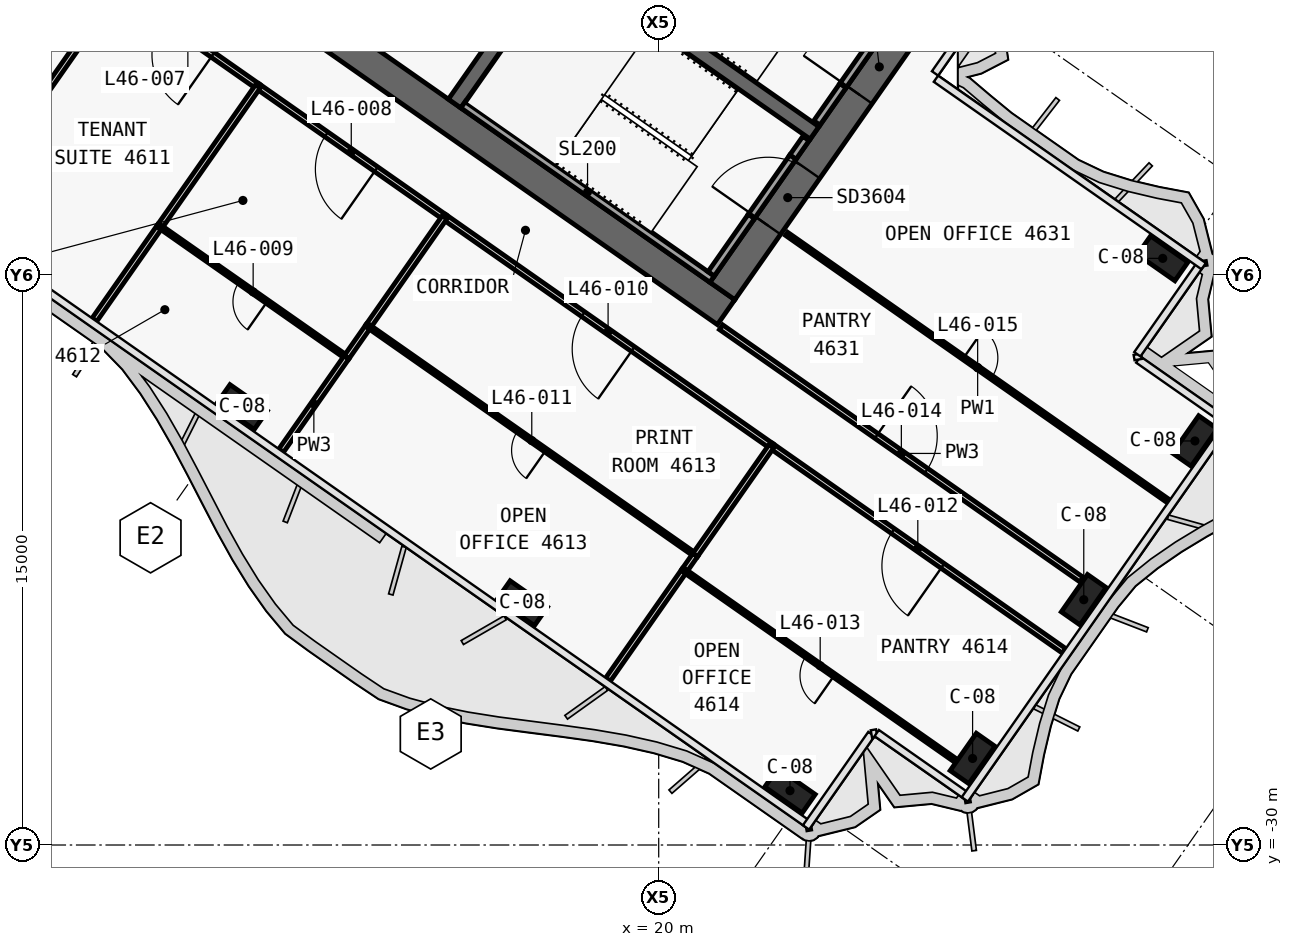
"""IFC4 building model, lengths in metres.
Left out: names, types, materials, properties, quantities, classifications, styles, units other than length and angle.
Written with IfcOpenShell. Run it as: python <this file> out.ifc"""

import sys

from ifc_helpers import new_model, si_unit, direction, frame, frame_2d, origin, origin_2d, place, context, subcontext, project, spatial, polyline, rectangle, outline, extrude, element, fill, save


model = new_model("IFC4")
c1 = context("Model", 3, precision=1e-05, world=origin(), true_north=direction((0.0, 1.0)))
c2 = subcontext(c1, "Body", "Model", "MODEL_VIEW")
j1 = project(units=[si_unit("LENGTHUNIT", "METRE"), si_unit("PLANEANGLEUNIT", "RADIAN")], contexts=[c1])
p1 = place(None, origin())
s1 = spatial("IfcSite", under=j1, at=p1, CompositionType="ELEMENT")
p2 = place(p1, origin())
s2 = spatial("IfcBuilding", under=s1, at=p2, CompositionType="ELEMENT")
p3 = place(p2, frame((0.0, 0.0, 198.3)))
s3 = spatial("IfcBuildingStorey", under=s2, at=p3, CompositionType="ELEMENT", Elevation=198.3)
p4 = place(p3, frame((-0.029, -0.712, 0.0), z_axis=(0.0, 0.0, 1.0), x_axis=(0.819151758019, -0.573576845187, 0.0)))
e1 = element("IfcWall", 1, at=p4, inside=s3, PredefinedType="SHEAR", context=c2, shape_type="SweptSolid", body=[
    extrude(outline(polyline([(26.616, 0.4), (-0.0, 0.4), (0.56, -0.4), (26.616, -0.4), (26.616, 0.4)])), origin(), (0.0, 0.0, 1.0), 3.9),
])
p5 = place(p4, frame((1.166, 0.0, 0.0)))
e2 = element("IfcOpeningElement", 2, at=p5, cuts=e1, PredefinedType="OPENING", context=c2, shape_type="SweptSolid", body=[
    extrude(rectangle(XDim=1.5, YDim=2.1, at=frame_2d((0.75, 1.05))), frame((0.0, 0.41, 0.0), z_axis=(0.0, -1.0, 0.0), x_axis=(1.0, 0.0, 0.0)), (0.0, 0.0, 1.0), 0.82),
])
p6 = place(p4, frame((12.366, 0.0, 0.0)))
e3 = element("IfcOpeningElement", 3, at=p6, cuts=e1, PredefinedType="OPENING", context=c2, shape_type="SweptSolid", body=[
    extrude(rectangle(XDim=1.5, YDim=2.1, at=frame_2d((0.75, 1.05))), frame((0.0, 0.41, 0.0), z_axis=(0.0, -1.0, 0.0), x_axis=(1.0, 0.0, 0.0)), (0.0, 0.0, 1.0), 0.82),
])
p7 = place(p3, frame((21.675, -15.421, 0.0), z_axis=(0.0, 0.0, 1.0), x_axis=(0.573581815061, 0.819148278049, 0.0)))
e4 = element("IfcWall", 4, at=p7, inside=s3, PredefinedType="SHEAR", context=c2, shape_type="SweptSolid", body=[
    extrude(outline(polyline([(9.6, 0.4), (0.0, 0.4), (0.0, -0.4), (9.6, -0.4), (9.6, 0.4)])), origin(), (0.0, 0.0, 1.0), 3.9),
])
p8 = place(p7, frame((6.3, 0.0, 0.0)))
e5 = element("IfcOpeningElement", 5, at=p8, cuts=e4, PredefinedType="OPENING", context=c2, shape_type="SweptSolid", body=[
    extrude(rectangle(XDim=1.8, YDim=2.1, at=frame_2d((0.9, 1.05))), frame((0.0, 0.41, 0.0), z_axis=(0.0, -1.0, 0.0), x_axis=(1.0, 0.0, 0.0)), (0.0, 0.0, 1.0), 0.82),
])
p9 = place(p7, frame((2.1, 0.0, 0.0)))
e6 = element("IfcOpeningElement", 6, at=p9, cuts=e4, PredefinedType="OPENING", context=c2, shape_type="SweptSolid", body=[
    extrude(rectangle(XDim=1.8, YDim=2.1, at=frame_2d((0.9, 1.05))), frame((0.0, 0.41, 0.0), z_axis=(0.0, -1.0, 0.0), x_axis=(1.0, 0.0, 0.0)), (0.0, 0.0, 1.0), 0.82),
])
p10 = place(p3, frame((14.63, -10.488, 0.0), z_axis=(0.0, 0.0, 1.0), x_axis=(0.573611936273, 0.819127185829, 0.0)))
e7 = element("IfcWall", 7, at=p10, inside=s3, PredefinedType="SHEAR", context=c2, shape_type="SweptSolid", body=[
    extrude(outline(polyline([(0.0, 0.2), (0.0, -0.2), (4.6, -0.2), (4.6, 0.2), (0.0, 0.2)])), origin(), (0.0, 0.0, 1.0), 3.9),
])
p11 = place(p3, frame((2.638, 3.768, 0.0), z_axis=(0.0, 0.0, 1.0), x_axis=(0.81915267502, -0.573575535572, 0.0)))
e8 = element("IfcWall", 8, at=p11, inside=s3, PredefinedType="SHEAR", context=c2, shape_type="SweptSolid", body=[
    extrude(outline(polyline([(0.0, 0.2), (0.0, -0.2), (26.2, -0.2), (26.2, 0.2), (0.0, 0.2)])), origin(), (0.0, 0.0, 1.0), 3.9),
])
p12 = place(p11, frame((9.637, 0.0, 0.0)))
e9 = element("IfcOpeningElement", 9, at=p12, cuts=e8, PredefinedType="OPENING", context=c2, shape_type="SweptSolid", body=[
    extrude(rectangle(XDim=1.2, YDim=2.1, at=frame_2d((0.6, 1.05))), frame((0.0, 0.21, 0.0), z_axis=(0.0, -1.0, 0.0), x_axis=(1.0, 0.0, 0.0)), (0.0, 0.0, 1.0), 0.42),
])
p13 = place(p11, frame((11.812, 0.0, 0.0)))
e10 = element("IfcOpeningElement", 10, at=p13, cuts=e8, PredefinedType="OPENING", context=c2, shape_type="SweptSolid", body=[
    extrude(rectangle(XDim=1.2, YDim=2.1, at=frame_2d((0.6, 1.05))), frame((0.0, 0.21, 0.0), z_axis=(0.0, -1.0, 0.0), x_axis=(1.0, 0.0, 0.0)), (0.0, 0.0, 1.0), 0.42),
])
p14 = place(p11, frame((13.988, 0.0, 0.0)))
e11 = element("IfcOpeningElement", 11, at=p14, cuts=e8, PredefinedType="OPENING", context=c2, shape_type="SweptSolid", body=[
    extrude(rectangle(XDim=1.2, YDim=2.1, at=frame_2d((0.6, 1.05))), frame((0.0, 0.21, 0.0), z_axis=(0.0, -1.0, 0.0), x_axis=(1.0, 0.0, 0.0)), (0.0, 0.0, 1.0), 0.42),
])
p15 = place(p11, frame((16.262, 0.0, 0.0)))
e12 = element("IfcOpeningElement", 12, at=p15, cuts=e8, PredefinedType="OPENING", context=c2, shape_type="SweptSolid", body=[
    extrude(rectangle(XDim=1.0, YDim=2.1, at=frame_2d((0.5, 1.05))), frame((0.0, 0.21, 0.0), z_axis=(0.0, -1.0, 0.0), x_axis=(1.0, 0.0, 0.0)), (0.0, 0.0, 1.0), 0.42),
])
for number, where, z_axis, x_axis in (
    (13, (9.038, -18.475, 0.0), (0.0, 0.0, 1.0), (0.819, -0.574, 0.0)),
    (14, (16.41, -23.637, 0.0), (0.0, 0.0, 1.0), (0.819, -0.574, 0.0)),
    (15, (23.455, -28.57, 0.0), (0.0, 0.0, 1.0), (0.819, -0.574, 0.0)),
    (16, (33.263, -14.562, 0.0), (0.0, 0.0, 1.0), (0.819, -0.574, 0.0)),
    (17, (28.26, -27.723, 0.0), (0.0, 0.0, 1.0), (0.574, 0.819, 0.0)),
    (18, (31.185, -23.545, 0.0), (0.0, 0.0, 1.0), (0.574, 0.819, 0.0)),
    (19, (34.11, -19.367, 0.0), (0.0, 0.0, 1.0), (0.574, 0.819, 0.0)),
):
    element("IfcColumn", number, at=place(p3, frame(where, z_axis=z_axis, x_axis=x_axis)), inside=s3, PredefinedType="COLUMN", context=c2, shape_type="SweptSolid", body=[
        extrude(rectangle(XDim=1.2, YDim=0.6, at=origin_2d()), origin(), (0.0, 0.0, 1.0), 3.9),
    ])
p16 = place(p3, frame((24.162, -10.998, 0.0), z_axis=(0.0, 0.0, 1.0), x_axis=(0.573612502218, 0.819126789514, 0.0)))
e20 = element("IfcWall", 20, at=p16, inside=s3, PredefinedType="SOLIDWALL", context=c2, shape_type="SweptSolid", body=[
    extrude(rectangle(XDim=1.2, YDim=0.2, at=frame_2d((0.6, 0.0))), origin(), (0.0, 0.0, 1.0), 3.62),
])
p17 = place(p3, frame((24.85, -10.014, 2.15), z_axis=(0.0, 0.0, 1.0), x_axis=(0.573505465124, 0.819201734296, 0.0)))
e21 = element("IfcWall", 21, at=p17, inside=s3, PredefinedType="SOLIDWALL", context=c2, shape_type="SweptSolid", body=[
    extrude(rectangle(XDim=1.9, YDim=0.2, at=frame_2d((0.95, 0.0))), origin(), (0.0, 0.0, 1.0), 1.47),
])
p18 = place(p3, frame((14.851, -10.521, 0.0), z_axis=(0.0, 0.0, 1.0), x_axis=(0.819141584393, -0.57359137434, 0.0)))
e22 = element("IfcWall", 22, at=p18, inside=s3, PredefinedType="SOLIDWALL", context=c2, shape_type="SweptSolid", body=[
    extrude(rectangle(XDim=8.0, YDim=0.2, at=frame_2d((4.0, 0.0))), origin(), (0.0, 0.0, 1.0), 3.62),
])
p19 = place(p3, frame((21.38, -14.97, 0.0), z_axis=(0.0, 0.0, 1.0), x_axis=(0.573559770908, 0.819163713305, 0.0)))
e23 = element("IfcWall", 23, at=p19, inside=s3, PredefinedType="SOLIDWALL", context=c2, shape_type="SweptSolid", body=[
    extrude(rectangle(XDim=1.85, YDim=0.2, at=frame_2d((0.925, 0.0))), origin(), (0.0, 0.0, 1.0), 3.62),
])
p20 = place(p3, frame((23.531, -11.898, 0.0), z_axis=(0.0, 0.0, 1.0), x_axis=(0.573708088123, 0.819059844958, 0.0)))
e24 = element("IfcWall", 24, at=p20, inside=s3, PredefinedType="SOLIDWALL", context=c2, shape_type="SweptSolid", body=[
    extrude(rectangle(XDim=0.6, YDim=0.2, at=frame_2d((0.3, 0.0))), origin(), (0.0, 0.0, 1.0), 3.62),
])
p21 = place(p3, frame((22.441, -13.455, 2.15), z_axis=(0.0, 0.0, 1.0), x_axis=(0.573591692345, 0.819141361715, 0.0)))
e25 = element("IfcWall", 25, at=p21, inside=s3, PredefinedType="SOLIDWALL", context=c2, shape_type="SweptSolid", body=[
    extrude(rectangle(XDim=1.9, YDim=0.2, at=frame_2d((0.95, 0.0))), origin(), (0.0, 0.0, 1.0), 1.47),
])
p22 = place(p3, frame((21.642, -16.375, 0.0), z_axis=(0.0, 0.0, 1.0), x_axis=(0.819150694041, -0.573578364701, 0.0)))
e26 = element("IfcWall", 26, at=p22, inside=s3, PredefinedType="PARTITIONING", context=c2, shape_type="SweptSolid", body=[
    extrude(rectangle(XDim=11.58, YDim=0.15, at=frame_2d((5.79, 0.0))), origin(), (0.0, 0.0, 1.0), 3.0),
])
p23 = place(p22, frame((4.99, 0.0, 0.0)))
e27 = element("IfcOpeningElement", 27, at=p23, cuts=e26, PredefinedType="OPENING", context=c2, shape_type="SweptSolid", body=[
    extrude(rectangle(XDim=1.6, YDim=2.1, at=frame_2d((0.8, 1.05))), frame((0.0, 0.085, 0.0), z_axis=(0.0, -1.0, 0.0), x_axis=(1.0, 0.0, 0.0)), (0.0, 0.0, 1.0), 0.17),
])
p24 = place(p3, frame((9.454, -10.038, 0.0), z_axis=(0.0, 0.0, 1.0), x_axis=(-0.819142740634, 0.573589723117, 0.0)))
e28 = element("IfcWall", 28, at=p24, inside=s3, PredefinedType="PARTITIONING", context=c2, shape_type="SweptSolid", body=[
    extrude(rectangle(XDim=4.502, YDim=0.15, at=frame_2d((2.251, 0.0))), origin(), (0.0, 0.0, 1.0), 3.0),
])
p25 = place(p24, frame((1.451, 0.0, 0.0)))
e29 = element("IfcOpeningElement", 29, at=p25, cuts=e28, PredefinedType="OPENING", context=c2, shape_type="SweptSolid", body=[
    extrude(rectangle(XDim=1.6, YDim=2.1, at=frame_2d((0.8, 1.05))), frame((0.0, 0.085, 0.0), z_axis=(0.0, -1.0, 0.0), x_axis=(1.0, 0.0, 0.0)), (0.0, 0.0, 1.0), 0.17),
])
p26 = place(p3, frame((14.369, -13.479, 0.0), z_axis=(0.0, 0.0, 1.0), x_axis=(-0.819165052243, 0.573557858619, 0.0)))
e30 = element("IfcWall", 30, at=p26, inside=s3, PredefinedType="PARTITIONING", context=c2, shape_type="SweptSolid", body=[
    extrude(rectangle(XDim=6.004, YDim=0.15, at=frame_2d((3.002, 0.0))), origin(), (0.0, 0.0, 1.0), 3.0),
])
p27 = place(p26, frame((2.202, 0.0, 0.0)))
e31 = element("IfcOpeningElement", 31, at=p27, cuts=e30, PredefinedType="OPENING", context=c2, shape_type="SweptSolid", body=[
    extrude(rectangle(XDim=1.6, YDim=2.1, at=frame_2d((0.8, 1.05))), frame((0.0, 0.085, 0.0), z_axis=(0.0, -1.0, 0.0), x_axis=(1.0, 0.0, 0.0)), (0.0, 0.0, 1.0), 0.17),
])
p28 = place(p3, frame((22.97, -19.502, 0.0), z_axis=(0.0, 0.0, 1.0), x_axis=(-0.81915329441, 0.573574650989, 0.0)))
e32 = element("IfcWall", 32, at=p28, inside=s3, PredefinedType="PARTITIONING", context=c2, shape_type="SweptSolid", body=[
    extrude(rectangle(XDim=10.504, YDim=0.15, at=frame_2d((5.252, 0.0))), origin(), (0.0, 0.0, 1.0), 3.0),
])
p29 = place(p28, frame((4.452, 0.0, 0.0)))
e33 = element("IfcOpeningElement", 33, at=p29, cuts=e32, PredefinedType="OPENING", context=c2, shape_type="SweptSolid", body=[
    extrude(rectangle(XDim=1.6, YDim=2.1, at=frame_2d((0.8, 1.05))), frame((0.0, 0.085, 0.0), z_axis=(0.0, -1.0, 0.0), x_axis=(1.0, 0.0, 0.0)), (0.0, 0.0, 1.0), 0.17),
])
p30 = place(p3, frame((30.669, -24.893, 0.0), z_axis=(0.0, 0.0, 1.0), x_axis=(-0.819157500255, 0.573568644345, 0.0)))
e34 = element("IfcWall", 34, at=p30, inside=s3, PredefinedType="PARTITIONING", context=c2, shape_type="SweptSolid", body=[
    extrude(rectangle(XDim=9.402, YDim=0.15, at=frame_2d((4.701, 0.0))), origin(), (0.0, 0.0, 1.0), 2.9),
])
p31 = place(p30, frame((3.901, 0.0, 0.0)))
e35 = element("IfcOpeningElement", 35, at=p31, cuts=e34, PredefinedType="OPENING", context=c2, shape_type="SweptSolid", body=[
    extrude(rectangle(XDim=1.6, YDim=2.1, at=frame_2d((0.8, 1.05))), frame((0.0, 0.085, 0.0), z_axis=(0.0, -1.0, 0.0), x_axis=(1.0, 0.0, 0.0)), (0.0, 0.0, 1.0), 0.17),
])
p32 = place(p3, frame((23.363, -13.916, 0.0), z_axis=(0.0, 0.0, 1.0), x_axis=(0.819158127092, -0.57356774911, 0.0)))
e36 = element("IfcWall", 36, at=p32, inside=s3, PredefinedType="PARTITIONING", context=c2, shape_type="SweptSolid", body=[
    extrude(rectangle(XDim=12.28, YDim=0.1, at=frame_2d((6.14, 0.0))), origin(), (0.0, 0.0, 1.0), 2.9),
])
p33 = place(p32, frame((5.69, 0.0, 0.0)))
e37 = element("IfcOpeningElement", 37, at=p33, cuts=e36, PredefinedType="OPENING", context=c2, shape_type="SweptSolid", body=[
    extrude(rectangle(XDim=0.9, YDim=2.1, at=frame_2d((0.45, 1.05))), frame((0.0, 0.06, 0.0), z_axis=(0.0, -1.0, 0.0), x_axis=(1.0, 0.0, 0.0)), (0.0, 0.0, 1.0), 0.12),
])
p34 = place(p3, frame((6.872, -13.722, 0.0), z_axis=(0.0, 0.0, 1.0), x_axis=(-0.57364797641, -0.819101946745, 0.0)))
e38 = element("IfcWall", 38, at=p34, inside=s3, PredefinedType="PARTITIONING", context=c2, shape_type="SweptSolid", body=[
    extrude(rectangle(XDim=3.001, YDim=0.15, at=frame_2d((1.5, 0.0))), origin(), (0.0, 0.0, 1.0), 2.9),
])
p35 = place(p3, frame((9.452, -10.037, 0.0), z_axis=(0.0, 0.0, 1.0), x_axis=(-0.573553333433, -0.819168220641, 0.0)))
e39 = element("IfcWall", 39, at=p35, inside=s3, PredefinedType="PARTITIONING", context=c2, shape_type="SweptSolid", body=[
    extrude(rectangle(XDim=4.502, YDim=0.15, at=frame_2d((2.251, 0.0))), origin(), (0.0, 0.0, 1.0), 3.62),
])
p36 = place(p3, frame((1.849, -13.051, 0.0), z_axis=(0.0, 0.0, 1.0), x_axis=(0.573577493031, 0.819151304393, 0.0)))
e40 = element("IfcWall", 40, at=p36, inside=s3, PredefinedType="PARTITIONING", context=c2, shape_type="SweptSolid", body=[
    extrude(rectangle(XDim=6.83, YDim=0.15, at=frame_2d((3.415, 0.0))), origin(), (0.0, 0.0, 1.0), 3.0),
])
p37 = place(p3, frame((11.786, -17.165, 0.0), z_axis=(0.0, 0.0, 1.0), x_axis=(-0.819163097304, 0.573560650686, 0.0)))
e41 = element("IfcWall", 41, at=p37, inside=s3, PredefinedType="PARTITIONING", context=c2, shape_type="SweptSolid", body=[
    extrude(rectangle(XDim=6.0, YDim=0.1, at=frame_2d((3.0, 0.0))), origin(), (0.0, 0.0, 1.0), 3.0),
])
p38 = place(p37, frame((2.55, 0.0, 0.0)))
e42 = element("IfcOpeningElement", 42, at=p38, cuts=e41, PredefinedType="OPENING", context=c2, shape_type="SweptSolid", body=[
    extrude(rectangle(XDim=0.9, YDim=2.1, at=frame_2d((0.45, 1.05))), frame((0.0, 0.06, 0.0), z_axis=(0.0, -1.0, 0.0), x_axis=(1.0, 0.0, 0.0)), (0.0, 0.0, 1.0), 0.12),
])
p39 = place(p3, frame((11.786, -17.165, 0.0), z_axis=(0.0, 0.0, 1.0), x_axis=(-0.573566142353, -0.819159252128, 0.0)))
e43 = element("IfcWall", 43, at=p39, inside=s3, PredefinedType="PARTITIONING", context=c2, shape_type="SweptSolid", body=[
    extrude(rectangle(XDim=2.999, YDim=0.15, at=frame_2d((1.5, 0.0))), origin(), (0.0, 0.0, 1.0), 2.9),
])
p40 = place(p3, frame((12.361, -16.344, 0.0), z_axis=(0.0, 0.0, 1.0), x_axis=(-0.573576907489, -0.819151714394, 0.0)))
e44 = element("IfcWall", 44, at=p40, inside=s3, PredefinedType="PARTITIONING", context=c2, shape_type="SweptSolid", body=[
    extrude(rectangle(XDim=1.001, YDim=0.15, at=frame_2d((0.5, 0.0))), origin(), (0.0, 0.0, 1.0), 3.62),
])
p41 = place(p3, frame((14.367, -13.479, 0.0), z_axis=(0.0, 0.0, 1.0), x_axis=(-0.573588676292, -0.819143473654, 0.0)))
e45 = element("IfcWall", 45, at=p41, inside=s3, PredefinedType="PARTITIONING", context=c2, shape_type="SweptSolid", body=[
    extrude(rectangle(XDim=3.502, YDim=0.15, at=frame_2d((1.751, 0.0))), origin(), (0.0, 0.0, 1.0), 3.62),
])
p42 = place(p3, frame((20.96, -22.369, 0.0), z_axis=(0.0, 0.0, 1.0), x_axis=(-0.81914452344, 0.573587177086, 0.0)))
e46 = element("IfcWall", 46, at=p42, inside=s3, PredefinedType="PARTITIONING", context=c2, shape_type="SweptSolid", body=[
    extrude(rectangle(XDim=10.5, YDim=0.1, at=frame_2d((5.25, 0.0))), origin(), (0.0, 0.0, 1.0), 3.0),
])
p43 = place(p42, frame((4.8, 0.0, 0.0)))
e47 = element("IfcOpeningElement", 47, at=p43, cuts=e46, PredefinedType="OPENING", context=c2, shape_type="SweptSolid", body=[
    extrude(rectangle(XDim=0.9, YDim=2.1, at=frame_2d((0.45, 1.05))), frame((0.0, 0.06, 0.0), z_axis=(0.0, -1.0, 0.0), x_axis=(1.0, 0.0, 0.0)), (0.0, 0.0, 1.0), 0.12),
])
p44 = place(p3, frame((20.675, -22.777, 0.0), z_axis=(0.0, 0.0, 1.0), x_axis=(-0.573560622794, -0.819163116834, 0.0)))
e48 = element("IfcWall", 48, at=p44, inside=s3, PredefinedType="PARTITIONING", context=c2, shape_type="SweptSolid", body=[
    extrude(rectangle(XDim=3.501, YDim=0.15, at=frame_2d((1.75, 0.0))), origin(), (0.0, 0.0, 1.0), 2.9),
])
p45 = place(p3, frame((20.96, -22.369, 0.0), z_axis=(0.0, 0.0, 1.0), x_axis=(-0.573560455774, -0.819163233777, 0.0)))
e49 = element("IfcWall", 49, at=p45, inside=s3, PredefinedType="PARTITIONING", context=c2, shape_type="SweptSolid", body=[
    extrude(rectangle(XDim=0.501, YDim=0.15, at=frame_2d((0.25, 0.0))), origin(), (0.0, 0.0, 1.0), 3.62),
])
p46 = place(p3, frame((22.969, -19.501, 0.0), z_axis=(0.0, 0.0, 1.0), x_axis=(-0.573598101901, -0.81913687348, 0.0)))
e50 = element("IfcWall", 50, at=p46, inside=s3, PredefinedType="PARTITIONING", context=c2, shape_type="SweptSolid", body=[
    extrude(rectangle(XDim=3.5, YDim=0.15, at=frame_2d((1.75, 0.0))), origin(), (0.0, 0.0, 1.0), 3.62),
])
p47 = place(p3, frame((27.825, -27.786, 0.0), z_axis=(0.0, 0.0, 1.0), x_axis=(-0.819149140433, 0.573580583465, 0.0)))
e51 = element("IfcWall", 51, at=p47, inside=s3, PredefinedType="PARTITIONING", context=c2, shape_type="SweptSolid", body=[
    extrude(rectangle(XDim=8.73, YDim=0.1, at=frame_2d((4.365, 0.0))), origin(), (0.0, 0.0, 1.0), 2.9),
])
p48 = place(p47, frame((3.915, 0.0, 0.0)))
e52 = element("IfcOpeningElement", 52, at=p48, cuts=e51, PredefinedType="OPENING", context=c2, shape_type="SweptSolid", body=[
    extrude(rectangle(XDim=0.9, YDim=2.1, at=frame_2d((0.45, 1.05))), frame((0.0, 0.06, 0.0), z_axis=(0.0, -1.0, 0.0), x_axis=(1.0, 0.0, 0.0)), (0.0, 0.0, 1.0), 0.12),
])
p49 = place(p8, origin())
e53 = element("IfcDoor", 53, at=p49, inside=s3, OperationType="DOUBLE_DOOR_SINGLE_SWING", PredefinedType="DOOR", context=c2, shape_type="SweptSolid", body=[
    extrude(rectangle(XDim=1.8, YDim=2.1, at=frame_2d((0.9, 1.05))), frame((0.0, 0.025, 0.0), z_axis=(0.0, -1.0, 0.0), x_axis=(1.0, 0.0, 0.0)), (0.0, 0.0, 1.0), 0.05),
])
fill(e5, e53)
p50 = place(p9, origin())
e54 = element("IfcDoor", 54, at=p50, inside=s3, OperationType="DOUBLE_DOOR_SINGLE_SWING", PredefinedType="DOOR", context=c2, shape_type="SweptSolid", body=[
    extrude(rectangle(XDim=1.8, YDim=2.1, at=frame_2d((0.9, 1.05))), frame((0.0, 0.025, 0.0), z_axis=(0.0, -1.0, 0.0), x_axis=(1.0, 0.0, 0.0)), (0.0, 0.0, 1.0), 0.05),
])
fill(e6, e54)
p51 = place(p25, origin())
e55 = element("IfcDoor", 55, at=p51, inside=s3, OperationType="DOUBLE_DOOR_SINGLE_SWING", PredefinedType="DOOR", context=c2, shape_type="SweptSolid", body=[
    extrude(rectangle(XDim=1.6, YDim=2.1, at=frame_2d((0.8, 1.05))), frame((0.0, 0.025, 0.0), z_axis=(0.0, -1.0, 0.0), x_axis=(1.0, 0.0, 0.0)), (0.0, 0.0, 1.0), 0.05),
])
fill(e29, e55)
p52 = place(p27, origin())
e56 = element("IfcDoor", 56, at=p52, inside=s3, OperationType="DOUBLE_DOOR_SINGLE_SWING", PredefinedType="DOOR", context=c2, shape_type="SweptSolid", body=[
    extrude(rectangle(XDim=1.6, YDim=2.1, at=frame_2d((0.8, 1.05))), frame((0.0, 0.025, 0.0), z_axis=(0.0, -1.0, 0.0), x_axis=(1.0, 0.0, 0.0)), (0.0, 0.0, 1.0), 0.05),
])
fill(e31, e56)
p53 = place(p38, origin())
e57 = element("IfcDoor", 57, at=p53, inside=s3, OperationType="SINGLE_SWING_LEFT", PredefinedType="DOOR", context=c2, shape_type="SweptSolid", body=[
    extrude(rectangle(XDim=0.9, YDim=2.1, at=frame_2d((0.45, 1.05))), frame((0.0, 0.025, 0.0), z_axis=(0.0, -1.0, 0.0), x_axis=(1.0, 0.0, 0.0)), (0.0, 0.0, 1.0), 0.05),
])
fill(e42, e57)
p54 = place(p29, origin())
e58 = element("IfcDoor", 58, at=p54, inside=s3, OperationType="DOUBLE_DOOR_SINGLE_SWING", PredefinedType="DOOR", context=c2, shape_type="SweptSolid", body=[
    extrude(rectangle(XDim=1.6, YDim=2.1, at=frame_2d((0.8, 1.05))), frame((0.0, 0.025, 0.0), z_axis=(0.0, -1.0, 0.0), x_axis=(1.0, 0.0, 0.0)), (0.0, 0.0, 1.0), 0.05),
])
fill(e33, e58)
p55 = place(p43, origin())
e59 = element("IfcDoor", 59, at=p55, inside=s3, OperationType="SINGLE_SWING_RIGHT", PredefinedType="DOOR", context=c2, shape_type="SweptSolid", body=[
    extrude(rectangle(XDim=0.9, YDim=2.1, at=frame_2d((0.45, 1.05))), frame((0.0, 0.025, 0.0), z_axis=(0.0, -1.0, 0.0), x_axis=(1.0, 0.0, 0.0)), (0.0, 0.0, 1.0), 0.05),
])
fill(e47, e59)
p56 = place(p31, origin())
e60 = element("IfcDoor", 60, at=p56, inside=s3, OperationType="DOUBLE_DOOR_SINGLE_SWING", PredefinedType="DOOR", context=c2, shape_type="SweptSolid", body=[
    extrude(rectangle(XDim=1.6, YDim=2.1, at=frame_2d((0.8, 1.05))), frame((0.0, 0.025, 0.0), z_axis=(0.0, -1.0, 0.0), x_axis=(1.0, 0.0, 0.0)), (0.0, 0.0, 1.0), 0.05),
])
fill(e35, e60)
p57 = place(p48, origin())
e61 = element("IfcDoor", 61, at=p57, inside=s3, OperationType="SINGLE_SWING_LEFT", PredefinedType="DOOR", context=c2, shape_type="SweptSolid", body=[
    extrude(rectangle(XDim=0.9, YDim=2.1, at=frame_2d((0.45, 1.05))), frame((0.0, 0.025, 0.0), z_axis=(0.0, -1.0, 0.0), x_axis=(1.0, 0.0, 0.0)), (0.0, 0.0, 1.0), 0.05),
])
fill(e52, e61)
p58 = place(p23, origin())
e62 = element("IfcDoor", 62, at=p58, inside=s3, OperationType="DOUBLE_DOOR_SINGLE_SWING", PredefinedType="DOOR", context=c2, shape_type="SweptSolid", body=[
    extrude(rectangle(XDim=1.6, YDim=2.1, at=frame_2d((0.8, 1.05))), frame((0.0, 0.025, 0.0), z_axis=(0.0, -1.0, 0.0), x_axis=(1.0, 0.0, 0.0)), (0.0, 0.0, 1.0), 0.05),
])
fill(e27, e62)
p59 = place(p33, origin())
e63 = element("IfcDoor", 63, at=p59, inside=s3, OperationType="SINGLE_SWING_RIGHT", PredefinedType="DOOR", context=c2, shape_type="SweptSolid", body=[
    extrude(rectangle(XDim=0.9, YDim=2.1, at=frame_2d((0.45, 1.05))), frame((0.0, 0.025, 0.0), z_axis=(0.0, -1.0, 0.0), x_axis=(1.0, 0.0, 0.0)), (0.0, 0.0, 1.0), 0.05),
])
fill(e37, e63)
save(model, sys.argv[1])
